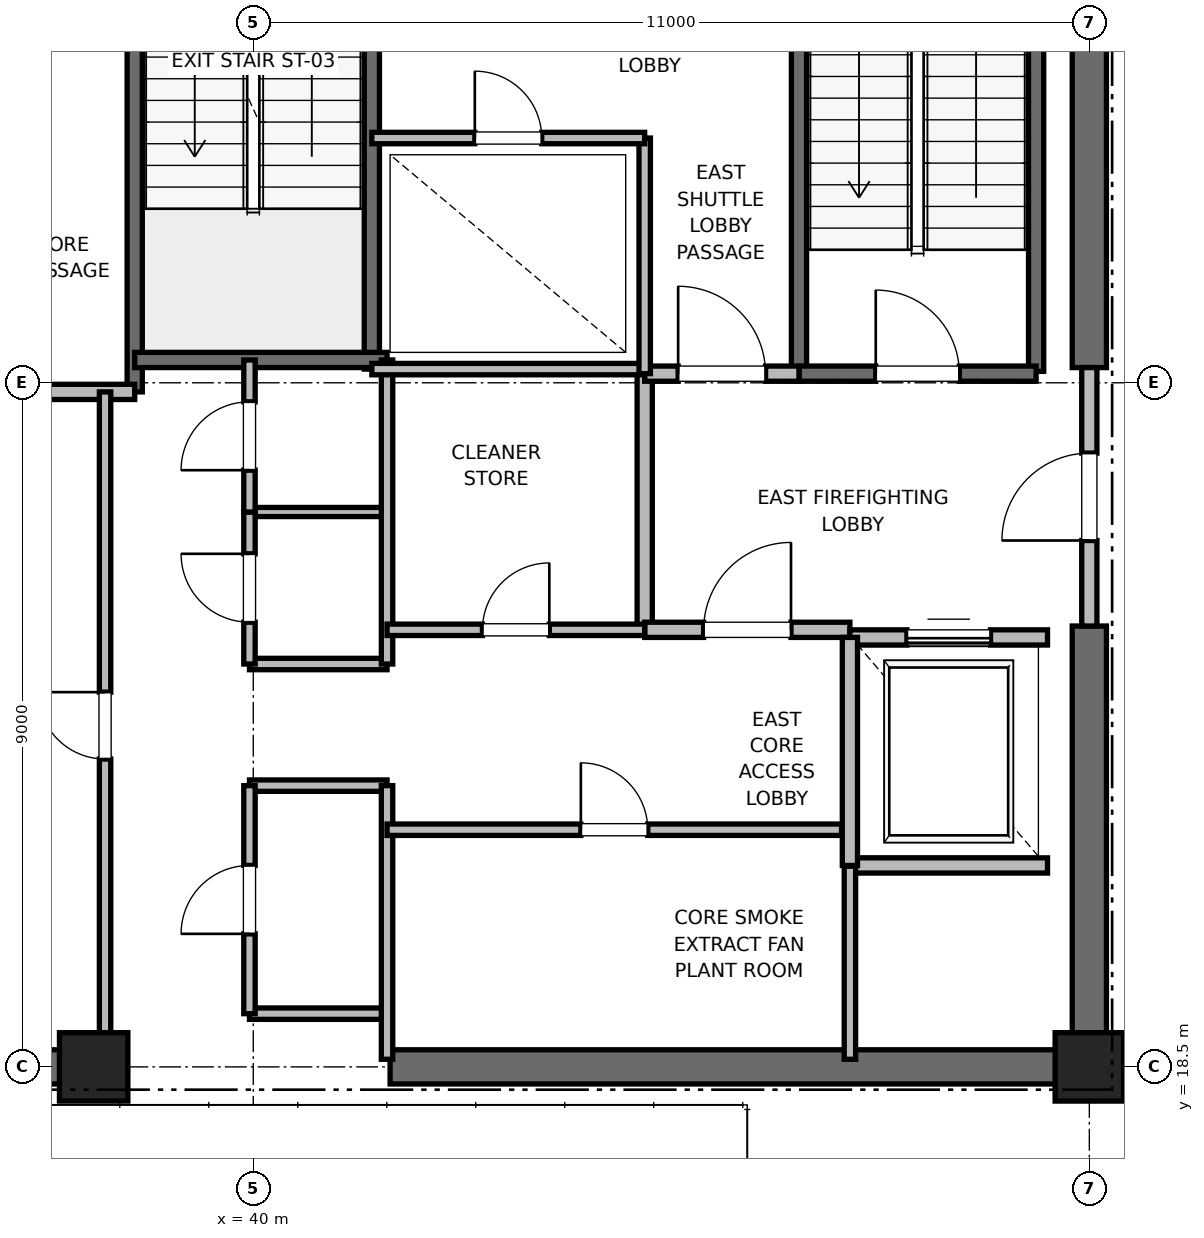
"""IFC4 building model, lengths in metres.
Left out: names, types, materials, properties, quantities, classifications, styles, units other than length and angle.
Written with IfcOpenShell. Run it as: python <this file> out.ifc"""

import sys

from ifc_helpers import new_model, si_unit, direction, frame, frame_2d, origin, origin_2d, place, context, subcontext, project, spatial, rectangle, extrude, element, fill, save


model = new_model("IFC4")
c1 = context("Model", 3, precision=1e-05, world=origin(), true_north=direction((0.0, 1.0)))
c2 = subcontext(c1, "Body", "Model", "MODEL_VIEW")
j1 = project(units=[si_unit("LENGTHUNIT", "METRE"), si_unit("PLANEANGLEUNIT", "RADIAN")], contexts=[c1])
p1 = place(None, origin())
s1 = spatial("IfcSite", under=j1, at=p1, CompositionType="ELEMENT")
p2 = place(p1, origin())
s2 = spatial("IfcBuilding", under=s1, at=p2, CompositionType="ELEMENT")
p3 = place(p2, frame((0.0, 0.0, 301.0)))
s3 = spatial("IfcBuildingStorey", under=s2, at=p3, CompositionType="ELEMENT", Elevation=301.0)
for number, where, z_axis, x_axis in (
    (1, (51.0, 18.5, 0.0), (0.0, 0.0, 1.0), (1.0, 0.0, 0.0)),
    (2, (37.9, 18.5, 0.0), (0.0, 0.0, 1.0), (1.0, 0.0, 0.0)),
):
    element("IfcColumn", number, at=place(p3, frame(where, z_axis=z_axis, x_axis=x_axis)), inside=s3, PredefinedType="PILASTER", context=c2, shape_type="SweptSolid", body=[
        extrude(rectangle(XDim=0.9, YDim=0.9, at=origin_2d()), origin(), (0.0, 0.0, 1.0), 5.8),
    ])
for number, where, z_axis, x_axis in (
    (3, (29.0, 18.5, 0.0), (0.0, 0.0, 1.0), (1.0, 0.0, 0.0)),
    (4, (41.8, 18.5, 0.0), (0.0, 0.0, 1.0), (1.0, 0.0, 0.0)),
):
    element("IfcWall", number, at=place(p3, frame(where, z_axis=z_axis, x_axis=x_axis)), inside=s3, PredefinedType="SHEAR", context=c2, shape_type="SweptSolid", body=[
        extrude(rectangle(XDim=9.2, YDim=0.45, at=frame_2d((4.6, 0.0))), origin(), (0.0, 0.0, 1.0), 5.585),
    ])
p4 = place(p3, frame((51.0, 18.5, 0.0), z_axis=(0.0, 0.0, 1.0), x_axis=(0.0, 1.0, 0.0)))
e5 = element("IfcWall", 5, at=p4, inside=s3, PredefinedType="SHEAR", context=c2, shape_type="SweptSolid", body=[
    extrude(rectangle(XDim=5.8, YDim=0.45, at=frame_2d((2.9, 0.0))), origin(), (0.0, 0.0, 1.0), 5.585),
])
p5 = place(p3, frame((51.0, 27.7, 0.0), z_axis=(0.0, 0.0, 1.0), x_axis=(0.0, 1.0, 0.0)))
e6 = element("IfcWall", 6, at=p5, inside=s3, PredefinedType="SHEAR", context=c2, shape_type="SweptSolid", body=[
    extrude(rectangle(XDim=8.8, YDim=0.45, at=frame_2d((4.4, 0.0))), origin(), (0.0, 0.0, 1.0), 5.585),
])
p6 = place(p3, frame((50.3, 27.65, 0.0), z_axis=(0.0, 0.0, 1.0), x_axis=(0.0, 1.0, 0.0)))
e7 = element("IfcWall", 7, at=p6, inside=s3, PredefinedType="SOLIDWALL", context=c2, shape_type="SweptSolid", body=[
    extrude(rectangle(XDim=8.15, YDim=0.2, at=frame_2d((4.075, 0.0))), origin(), (0.0, 0.0, 1.0), 5.585),
])
p7 = place(p3, frame((47.18, 27.62, 0.0), z_axis=(0.0, 0.0, 1.0), x_axis=(0.0, 1.0, 0.0)))
e8 = element("IfcWall", 8, at=p7, inside=s3, PredefinedType="SOLIDWALL", context=c2, shape_type="SweptSolid", body=[
    extrude(rectangle(XDim=8.18, YDim=0.2, at=frame_2d((4.09, 0.0))), origin(), (0.0, 0.0, 1.0), 5.585),
])
p8 = place(p3, frame((47.18, 27.62, 0.0), z_axis=(0.0, 0.0, 1.0), x_axis=(1.0, 0.0, 0.0)))
e9 = element("IfcWall", 9, at=p8, inside=s3, PredefinedType="SOLIDWALL", context=c2, shape_type="SweptSolid", body=[
    extrude(rectangle(XDim=3.12, YDim=0.2, at=frame_2d((1.56, 0.0))), origin(), (0.0, 0.0, 1.0), 5.585),
])
p9 = place(p8, frame((1.01, 0.0, 0.0)))
e10 = element("IfcOpeningElement", 10, at=p9, cuts=e9, PredefinedType="OPENING", context=c2, shape_type="SweptSolid", body=[
    extrude(rectangle(XDim=1.1, YDim=2.15, at=frame_2d((0.55, 1.075))), frame((0.0, 0.1, 0.0), z_axis=(0.0, -1.0, 0.0), x_axis=(1.0, 0.0, 0.0)), (0.0, 0.0, 1.0), 0.2),
])
p10 = place(p3, frame((38.44, 27.38, 0.0), z_axis=(0.0, 0.0, 1.0), x_axis=(0.0, 1.0, 0.0)))
e11 = element("IfcWall", 11, at=p10, inside=s3, PredefinedType="SOLIDWALL", context=c2, shape_type="SweptSolid", body=[
    extrude(rectangle(XDim=8.87, YDim=0.2, at=frame_2d((4.435, 0.0))), origin(), (0.0, 0.0, 1.0), 5.585),
])
p11 = place(p3, frame((41.56, 27.68, 0.0), z_axis=(0.0, 0.0, 1.0), x_axis=(0.0, 1.0, 0.0)))
e12 = element("IfcWall", 12, at=p11, inside=s3, PredefinedType="SOLIDWALL", context=c2, shape_type="SweptSolid", body=[
    extrude(rectangle(XDim=8.57, YDim=0.2, at=frame_2d((4.285, 0.0))), origin(), (0.0, 0.0, 1.0), 5.585),
])
p12 = place(p3, frame((38.44, 27.8, 0.0), z_axis=(0.0, 0.0, 1.0), x_axis=(1.0, 0.0, 0.0)))
e13 = element("IfcWall", 13, at=p12, inside=s3, PredefinedType="SOLIDWALL", context=c2, shape_type="SweptSolid", body=[
    extrude(rectangle(XDim=3.32, YDim=0.2, at=frame_2d((1.66, 0.0))), origin(), (0.0, 0.0, 1.0), 5.585),
])
p13 = place(p3, frame((32.82, 27.38, 0.0), z_axis=(0.0, 0.0, 1.0), x_axis=(1.0, 0.0, 0.0)))
e14 = element("IfcWall", 14, at=p13, inside=s3, PredefinedType="PARTITIONING", context=c2, shape_type="SweptSolid", body=[
    extrude(rectangle(XDim=5.62, YDim=0.2, at=frame_2d((2.81, 0.0))), origin(), (0.0, 0.0, 1.0), 5.585),
])
p14 = place(p3, frame((45.15, 24.25, 0.0), z_axis=(0.0, 0.0, 1.0), x_axis=(0.0, 1.0, 0.0)))
e15 = element("IfcWall", 15, at=p14, inside=s3, PredefinedType="PARTITIONING", context=c2, shape_type="SweptSolid", body=[
    extrude(rectangle(XDim=3.37, YDim=0.2, at=frame_2d((1.685, 0.0))), origin(), (0.0, 0.0, 1.0), 5.585),
])
p15 = place(p3, frame((45.15, 24.25, 0.0), z_axis=(0.0, 0.0, 1.0), x_axis=(1.0, 0.0, 0.0)))
e16 = element("IfcWall", 16, at=p15, inside=s3, PredefinedType="PARTITIONING", context=c2, shape_type="SweptSolid", body=[
    extrude(rectangle(XDim=2.7, YDim=0.2, at=frame_2d((1.35, 0.0))), origin(), (0.0, 0.0, 1.0), 5.585),
])
p16 = place(p15, frame((0.775, 0.0, 0.0)))
e17 = element("IfcOpeningElement", 17, at=p16, cuts=e16, PredefinedType="OPENING", context=c2, shape_type="SweptSolid", body=[
    extrude(rectangle(XDim=1.15, YDim=2.2, at=frame_2d((0.575, 1.1))), frame((0.0, 0.1, 0.0), z_axis=(0.0, -1.0, 0.0), x_axis=(1.0, 0.0, 0.0)), (0.0, 0.0, 1.0), 0.2),
])
p17 = place(p3, frame((45.15, 27.62, 0.0), z_axis=(0.0, 0.0, 1.0), x_axis=(1.0, 0.0, 0.0)))
e18 = element("IfcWall", 18, at=p17, inside=s3, PredefinedType="PARTITIONING", context=c2, shape_type="SweptSolid", body=[
    extrude(rectangle(XDim=2.03, YDim=0.2, at=frame_2d((1.015, 0.0))), origin(), (0.0, 0.0, 1.0), 5.585),
])
p18 = place(p17, frame((0.44, 0.0, 0.0)))
e19 = element("IfcOpeningElement", 19, at=p18, cuts=e18, PredefinedType="OPENING", context=c2, shape_type="SweptSolid", body=[
    extrude(rectangle(XDim=1.15, YDim=2.2, at=frame_2d((0.575, 1.1))), frame((0.0, 0.1, 0.0), z_axis=(0.0, -1.0, 0.0), x_axis=(1.0, 0.0, 0.0)), (0.0, 0.0, 1.0), 0.2),
])
p19 = place(p3, frame((51.0, 24.3, 0.0), z_axis=(0.0, 0.0, 1.0), x_axis=(0.0, 1.0, 0.0)))
e20 = element("IfcWall", 20, at=p19, inside=s3, PredefinedType="PARTITIONING", context=c2, shape_type="SweptSolid", body=[
    extrude(rectangle(XDim=3.4, YDim=0.2, at=frame_2d((1.7, 0.0))), origin(), (0.0, 0.0, 1.0), 4.665),
])
p20 = place(p19, frame((1.125, 0.0, 0.0)))
e21 = element("IfcOpeningElement", 21, at=p20, cuts=e20, PredefinedType="OPENING", context=c2, shape_type="SweptSolid", body=[
    extrude(rectangle(XDim=1.15, YDim=2.2, at=frame_2d((0.575, 1.1))), frame((0.0, 0.1, 0.0), z_axis=(0.0, -1.0, 0.0), x_axis=(1.0, 0.0, 0.0)), (0.0, 0.0, 1.0), 0.2),
])
p21 = place(p3, frame((47.85, 21.15, 0.0), z_axis=(0.0, 0.0, 1.0), x_axis=(1.0, 0.0, 0.0)))
e22 = element("IfcWall", 22, at=p21, inside=s3, PredefinedType="SOLIDWALL", context=c2, shape_type="SweptSolid", body=[
    extrude(rectangle(XDim=2.6, YDim=0.2, at=frame_2d((1.3, 0.0))), origin(), (0.0, 0.0, 1.0), 5.585),
])
p22 = place(p3, frame((50.45, 24.15, 0.0), z_axis=(0.0, 0.0, 1.0), x_axis=(-1.0, 0.0, 0.0)))
e23 = element("IfcWall", 23, at=p22, inside=s3, PredefinedType="SOLIDWALL", context=c2, shape_type="SweptSolid", body=[
    extrude(rectangle(XDim=2.6, YDim=0.2, at=frame_2d((1.3, 0.0))), origin(), (0.0, 0.0, 1.0), 4.665),
])
p23 = place(p22, frame((0.75, 0.0, 0.0)))
e24 = element("IfcOpeningElement", 24, at=p23, cuts=e23, PredefinedType="OPENING", context=c2, shape_type="SweptSolid", body=[
    extrude(rectangle(XDim=1.1, YDim=2.2, at=frame_2d((0.55, 1.1))), frame((0.0, 0.1, 0.0), z_axis=(0.0, -1.0, 0.0), x_axis=(1.0, 0.0, 0.0)), (0.0, 0.0, 1.0), 0.2),
])
p24 = place(p3, frame((47.85, 24.15, 0.0), z_axis=(0.0, 0.0, 1.0), x_axis=(0.0, -1.0, 0.0)))
e25 = element("IfcWall", 25, at=p24, inside=s3, PredefinedType="SOLIDWALL", context=c2, shape_type="SweptSolid", body=[
    extrude(rectangle(XDim=3.0, YDim=0.2, at=frame_2d((1.5, 0.0))), origin(), (0.0, 0.0, 1.0), 5.585),
])
for number, where, z_axis, x_axis in (
    (26, (39.95, 19.2, 0.0), (0.0, 0.0, 1.0), (1.0, 0.0, 0.0)),
    (27, (39.95, 22.2, 0.0), (0.0, 0.0, 1.0), (1.0, 0.0, 0.0)),
    (28, (39.95, 23.8, 0.0), (0.0, 0.0, 1.0), (1.0, 0.0, 0.0)),
):
    element("IfcWall", number, at=place(p3, frame(where, z_axis=z_axis, x_axis=x_axis)), inside=s3, PredefinedType="PARTITIONING", context=c2, shape_type="SweptSolid", body=[
        extrude(rectangle(XDim=1.81, YDim=0.15, at=frame_2d((0.905, 0.0))), origin(), (0.0, 0.0, 1.0), 2.85),
    ])
p25 = place(p3, frame((39.95, 25.8, 0.0), z_axis=(0.0, 0.0, 1.0), x_axis=(1.0, 0.0, 0.0)))
e29 = element("IfcWall", 29, at=p25, inside=s3, PredefinedType="PARTITIONING", context=c2, shape_type="SweptSolid", body=[
    extrude(rectangle(XDim=1.81, YDim=0.12, at=frame_2d((0.905, 0.0))), origin(), (0.0, 0.0, 1.0), 2.85),
])
p26 = place(p3, frame((41.76, 18.6, 0.0), z_axis=(0.0, 0.0, 1.0), x_axis=(0.0, 1.0, 0.0)))
e30 = element("IfcWall", 30, at=p26, inside=s3, PredefinedType="PARTITIONING", context=c2, shape_type="SweptSolid", body=[
    extrude(rectangle(XDim=3.6, YDim=0.15, at=frame_2d((1.8, 0.0))), origin(), (0.0, 0.0, 1.0), 2.85),
])
p27 = place(p3, frame((41.76, 23.8, 0.0), z_axis=(0.0, 0.0, 1.0), x_axis=(0.0, 1.0, 0.0)))
e31 = element("IfcWall", 31, at=p27, inside=s3, PredefinedType="PARTITIONING", context=c2, shape_type="SweptSolid", body=[
    extrude(rectangle(XDim=4.0, YDim=0.15, at=frame_2d((2.0, 0.0))), origin(), (0.0, 0.0, 1.0), 2.85),
])
p28 = place(p3, frame((39.95, 19.2, 0.0), z_axis=(0.0, 0.0, 1.0), x_axis=(0.0, 1.0, 0.0)))
e32 = element("IfcWall", 32, at=p28, inside=s3, PredefinedType="PARTITIONING", context=c2, shape_type="SweptSolid", body=[
    extrude(rectangle(XDim=3.0, YDim=0.15, at=frame_2d((1.5, 0.0))), origin(), (0.0, 0.0, 1.0), 2.85),
])
p29 = place(p28, frame((1.05, 0.0, 0.0)))
e33 = element("IfcOpeningElement", 33, at=p29, cuts=e32, PredefinedType="OPENING", context=c2, shape_type="SweptSolid", body=[
    extrude(rectangle(XDim=0.9, YDim=2.1, at=frame_2d((0.45, 1.05))), frame((0.0, 0.075, 0.0), z_axis=(0.0, -1.0, 0.0), x_axis=(1.0, 0.0, 0.0)), (0.0, 0.0, 1.0), 0.15),
])
p30 = place(p3, frame((39.95, 23.8, 0.0), z_axis=(0.0, 0.0, 1.0), x_axis=(0.0, 1.0, 0.0)))
e34 = element("IfcWall", 34, at=p30, inside=s3, PredefinedType="PARTITIONING", context=c2, shape_type="SweptSolid", body=[
    extrude(rectangle(XDim=2.0, YDim=0.15, at=frame_2d((1.0, 0.0))), origin(), (0.0, 0.0, 1.0), 2.85),
])
p31 = place(p30, frame((0.55, 0.0, 0.0)))
e35 = element("IfcOpeningElement", 35, at=p31, cuts=e34, PredefinedType="OPENING", context=c2, shape_type="SweptSolid", body=[
    extrude(rectangle(XDim=0.9, YDim=2.1, at=frame_2d((0.45, 1.05))), frame((0.0, 0.075, 0.0), z_axis=(0.0, -1.0, 0.0), x_axis=(1.0, 0.0, 0.0)), (0.0, 0.0, 1.0), 0.15),
])
p32 = place(p3, frame((39.95, 25.8, 0.0), z_axis=(0.0, 0.0, 1.0), x_axis=(0.0, 1.0, 0.0)))
e36 = element("IfcWall", 36, at=p32, inside=s3, PredefinedType="PARTITIONING", context=c2, shape_type="SweptSolid", body=[
    extrude(rectangle(XDim=2.0, YDim=0.15, at=frame_2d((1.0, 0.0))), origin(), (0.0, 0.0, 1.0), 2.85),
])
p33 = place(p32, frame((0.55, 0.0, 0.0)))
e37 = element("IfcOpeningElement", 37, at=p33, cuts=e36, PredefinedType="OPENING", context=c2, shape_type="SweptSolid", body=[
    extrude(rectangle(XDim=0.9, YDim=2.1, at=frame_2d((0.45, 1.05))), frame((0.0, 0.075, 0.0), z_axis=(0.0, -1.0, 0.0), x_axis=(1.0, 0.0, 0.0)), (0.0, 0.0, 1.0), 0.15),
])
p34 = place(p3, frame((38.05, 18.6, 0.0), z_axis=(0.0, 0.0, 1.0), x_axis=(0.0, 1.0, 0.0)))
e38 = element("IfcWall", 38, at=p34, inside=s3, PredefinedType="PARTITIONING", context=c2, shape_type="SweptSolid", body=[
    extrude(rectangle(XDim=8.78, YDim=0.15, at=frame_2d((4.39, 0.0))), origin(), (0.0, 0.0, 1.0), 2.85),
])
p35 = place(p34, frame((3.95, 0.0, 0.0)))
e39 = element("IfcOpeningElement", 39, at=p35, cuts=e38, PredefinedType="OPENING", context=c2, shape_type="SweptSolid", body=[
    extrude(rectangle(XDim=0.88, YDim=2.1, at=frame_2d((0.44, 1.05))), frame((0.0, 0.075, 0.0), z_axis=(0.0, -1.0, 0.0), x_axis=(1.0, 0.0, 0.0)), (0.0, 0.0, 1.0), 0.15),
])
p36 = place(p3, frame((41.56, 27.68, 0.0), z_axis=(0.0, 0.0, 1.0), x_axis=(1.0, 0.0, 0.0)))
e40 = element("IfcWall", 40, at=p36, inside=s3, PredefinedType="PARTITIONING", context=c2, shape_type="SweptSolid", body=[
    extrude(rectangle(XDim=3.59, YDim=0.15, at=frame_2d((1.795, 0.0))), origin(), (0.0, 0.0, 1.0), 2.85),
])
p37 = place(p3, frame((47.85, 18.6, 0.0), z_axis=(0.0, 0.0, 1.0), x_axis=(0.0, 1.0, 0.0)))
e41 = element("IfcWall", 41, at=p37, inside=s3, PredefinedType="PARTITIONING", context=c2, shape_type="SweptSolid", body=[
    extrude(rectangle(XDim=2.54, YDim=0.15, at=frame_2d((1.27, 0.0))), origin(), (0.0, 0.0, 1.0), 2.85),
])
p38 = place(p3, frame((41.76, 21.62, 0.0), z_axis=(0.0, 0.0, 1.0), x_axis=(1.0, 0.0, 0.0)))
e42 = element("IfcWall", 42, at=p38, inside=s3, PredefinedType="PARTITIONING", context=c2, shape_type="SweptSolid", body=[
    extrude(rectangle(XDim=5.98, YDim=0.15, at=frame_2d((2.99, 0.0))), origin(), (0.0, 0.0, 1.0), 2.85),
])
p39 = place(p38, frame((2.55, 0.0, 0.0)))
e43 = element("IfcOpeningElement", 43, at=p39, cuts=e42, PredefinedType="OPENING", context=c2, shape_type="SweptSolid", body=[
    extrude(rectangle(XDim=0.88, YDim=2.1, at=frame_2d((0.44, 1.05))), frame((0.0, 0.075, 0.0), z_axis=(0.0, -1.0, 0.0), x_axis=(1.0, 0.0, 0.0)), (0.0, 0.0, 1.0), 0.15),
])
p40 = place(p3, frame((41.76, 24.25, 0.0), z_axis=(0.0, 0.0, 1.0), x_axis=(1.0, 0.0, 0.0)))
e44 = element("IfcWall", 44, at=p40, inside=s3, PredefinedType="PARTITIONING", context=c2, shape_type="SweptSolid", body=[
    extrude(rectangle(XDim=3.39, YDim=0.15, at=frame_2d((1.695, 0.0))), origin(), (0.0, 0.0, 1.0), 2.85),
])
p41 = place(p40, frame((1.255, 0.0, 0.0)))
e45 = element("IfcOpeningElement", 45, at=p41, cuts=e44, PredefinedType="OPENING", context=c2, shape_type="SweptSolid", body=[
    extrude(rectangle(XDim=0.88, YDim=2.1, at=frame_2d((0.44, 1.05))), frame((0.0, 0.075, 0.0), z_axis=(0.0, -1.0, 0.0), x_axis=(1.0, 0.0, 0.0)), (0.0, 0.0, 1.0), 0.15),
])
p42 = place(p3, frame((45.15, 27.62, 0.0), z_axis=(0.0, 0.0, 1.0), x_axis=(0.0, 1.0, 0.0)))
e46 = element("IfcWall", 46, at=p42, inside=s3, PredefinedType="PARTITIONING", context=c2, shape_type="SweptSolid", body=[
    extrude(rectangle(XDim=3.1, YDim=0.15, at=frame_2d((1.55, 0.0))), origin(), (0.0, 0.0, 1.0), 2.85),
])
p43 = place(p3, frame((41.56, 30.72, 0.0), z_axis=(0.0, 0.0, 1.0), x_axis=(1.0, 0.0, 0.0)))
e47 = element("IfcWall", 47, at=p43, inside=s3, PredefinedType="PARTITIONING", context=c2, shape_type="SweptSolid", body=[
    extrude(rectangle(XDim=3.59, YDim=0.15, at=frame_2d((1.795, 0.0))), origin(), (0.0, 0.0, 1.0), 2.85),
])
p44 = place(p43, frame((1.355, 0.0, 0.0)))
e48 = element("IfcOpeningElement", 48, at=p44, cuts=e47, PredefinedType="OPENING", context=c2, shape_type="SweptSolid", body=[
    extrude(rectangle(XDim=0.88, YDim=2.1, at=frame_2d((0.44, 1.05))), frame((0.0, 0.075, 0.0), z_axis=(0.0, -1.0, 0.0), x_axis=(1.0, 0.0, 0.0)), (0.0, 0.0, 1.0), 0.15),
])
p45 = place(p9, origin())
e49 = element("IfcDoor", 49, at=p45, inside=s3, OperationType="SINGLE_SWING_LEFT", PredefinedType="DOOR", context=c2, shape_type="SweptSolid", body=[
    extrude(rectangle(XDim=1.1, YDim=2.15, at=frame_2d((0.55, 1.075))), frame((0.0, 0.025, 0.0), z_axis=(0.0, -1.0, 0.0), x_axis=(1.0, 0.0, 0.0)), (0.0, 0.0, 1.0), 0.05),
])
fill(e10, e49)
p46 = place(p16, origin())
e50 = element("IfcDoor", 50, at=p46, inside=s3, OperationType="SINGLE_SWING_RIGHT", PredefinedType="DOOR", context=c2, shape_type="SweptSolid", body=[
    extrude(rectangle(XDim=1.15, YDim=2.2, at=frame_2d((0.575, 1.1))), frame((0.0, 0.025, 0.0), z_axis=(0.0, -1.0, 0.0), x_axis=(1.0, 0.0, 0.0)), (0.0, 0.0, 1.0), 0.05),
])
fill(e17, e50)
p47 = place(p18, origin())
e51 = element("IfcDoor", 51, at=p47, inside=s3, OperationType="SINGLE_SWING_LEFT", PredefinedType="DOOR", context=c2, shape_type="SweptSolid", body=[
    extrude(rectangle(XDim=1.15, YDim=2.2, at=frame_2d((0.575, 1.1))), frame((0.0, 0.025, 0.0), z_axis=(0.0, -1.0, 0.0), x_axis=(1.0, 0.0, 0.0)), (0.0, 0.0, 1.0), 0.05),
])
fill(e19, e51)
p48 = place(p20, origin())
e52 = element("IfcDoor", 52, at=p48, inside=s3, OperationType="SINGLE_SWING_LEFT", PredefinedType="DOOR", context=c2, shape_type="SweptSolid", body=[
    extrude(rectangle(XDim=1.15, YDim=2.2, at=frame_2d((0.575, 1.1))), frame((0.0, 0.025, 0.0), z_axis=(0.0, -1.0, 0.0), x_axis=(1.0, 0.0, 0.0)), (0.0, 0.0, 1.0), 0.05),
])
fill(e21, e52)
p49 = place(p23, origin())
e53 = element("IfcDoor", 53, at=p49, inside=s3, OperationType="SLIDING_TO_RIGHT", PredefinedType="DOOR", context=c2, shape_type="SweptSolid", body=[
    extrude(rectangle(XDim=1.1, YDim=2.2, at=frame_2d((0.55, 1.1))), frame((0.0, 0.025, 0.0), z_axis=(0.0, -1.0, 0.0), x_axis=(1.0, 0.0, 0.0)), (0.0, 0.0, 1.0), 0.05),
])
fill(e24, e53)
p50 = place(p29, origin())
e54 = element("IfcDoor", 54, at=p50, inside=s3, OperationType="SINGLE_SWING_LEFT", PredefinedType="DOOR", context=c2, shape_type="SweptSolid", body=[
    extrude(rectangle(XDim=0.9, YDim=2.1, at=frame_2d((0.45, 1.05))), frame((0.0, 0.025, 0.0), z_axis=(0.0, -1.0, 0.0), x_axis=(1.0, 0.0, 0.0)), (0.0, 0.0, 1.0), 0.05),
])
fill(e33, e54)
p51 = place(p31, origin())
e55 = element("IfcDoor", 55, at=p51, inside=s3, OperationType="SINGLE_SWING_RIGHT", PredefinedType="DOOR", context=c2, shape_type="SweptSolid", body=[
    extrude(rectangle(XDim=0.9, YDim=2.1, at=frame_2d((0.45, 1.05))), frame((0.0, 0.025, 0.0), z_axis=(0.0, -1.0, 0.0), x_axis=(1.0, 0.0, 0.0)), (0.0, 0.0, 1.0), 0.05),
])
fill(e35, e55)
p52 = place(p33, origin())
e56 = element("IfcDoor", 56, at=p52, inside=s3, OperationType="SINGLE_SWING_LEFT", PredefinedType="DOOR", context=c2, shape_type="SweptSolid", body=[
    extrude(rectangle(XDim=0.9, YDim=2.1, at=frame_2d((0.45, 1.05))), frame((0.0, 0.025, 0.0), z_axis=(0.0, -1.0, 0.0), x_axis=(1.0, 0.0, 0.0)), (0.0, 0.0, 1.0), 0.05),
])
fill(e37, e56)
p53 = place(p35, origin())
e57 = element("IfcDoor", 57, at=p53, inside=s3, OperationType="SINGLE_SWING_RIGHT", PredefinedType="DOOR", context=c2, shape_type="SweptSolid", body=[
    extrude(rectangle(XDim=0.88, YDim=2.1, at=frame_2d((0.44, 1.05))), frame((0.0, 0.025, 0.0), z_axis=(0.0, -1.0, 0.0), x_axis=(1.0, 0.0, 0.0)), (0.0, 0.0, 1.0), 0.05),
])
fill(e39, e57)
p54 = place(p39, origin())
e58 = element("IfcDoor", 58, at=p54, inside=s3, OperationType="SINGLE_SWING_LEFT", PredefinedType="DOOR", context=c2, shape_type="SweptSolid", body=[
    extrude(rectangle(XDim=0.88, YDim=2.1, at=frame_2d((0.44, 1.05))), frame((0.0, 0.025, 0.0), z_axis=(0.0, -1.0, 0.0), x_axis=(1.0, 0.0, 0.0)), (0.0, 0.0, 1.0), 0.05),
])
fill(e43, e58)
p55 = place(p41, origin())
e59 = element("IfcDoor", 59, at=p55, inside=s3, OperationType="SINGLE_SWING_RIGHT", PredefinedType="DOOR", context=c2, shape_type="SweptSolid", body=[
    extrude(rectangle(XDim=0.88, YDim=2.1, at=frame_2d((0.44, 1.05))), frame((0.0, 0.025, 0.0), z_axis=(0.0, -1.0, 0.0), x_axis=(1.0, 0.0, 0.0)), (0.0, 0.0, 1.0), 0.05),
])
fill(e45, e59)
p56 = place(p44, origin())
e60 = element("IfcDoor", 60, at=p56, inside=s3, OperationType="SINGLE_SWING_LEFT", PredefinedType="DOOR", context=c2, shape_type="SweptSolid", body=[
    extrude(rectangle(XDim=0.88, YDim=2.1, at=frame_2d((0.44, 1.05))), frame((0.0, 0.025, 0.0), z_axis=(0.0, -1.0, 0.0), x_axis=(1.0, 0.0, 0.0)), (0.0, 0.0, 1.0), 0.05),
])
fill(e48, e60)
save(model, sys.argv[1])
